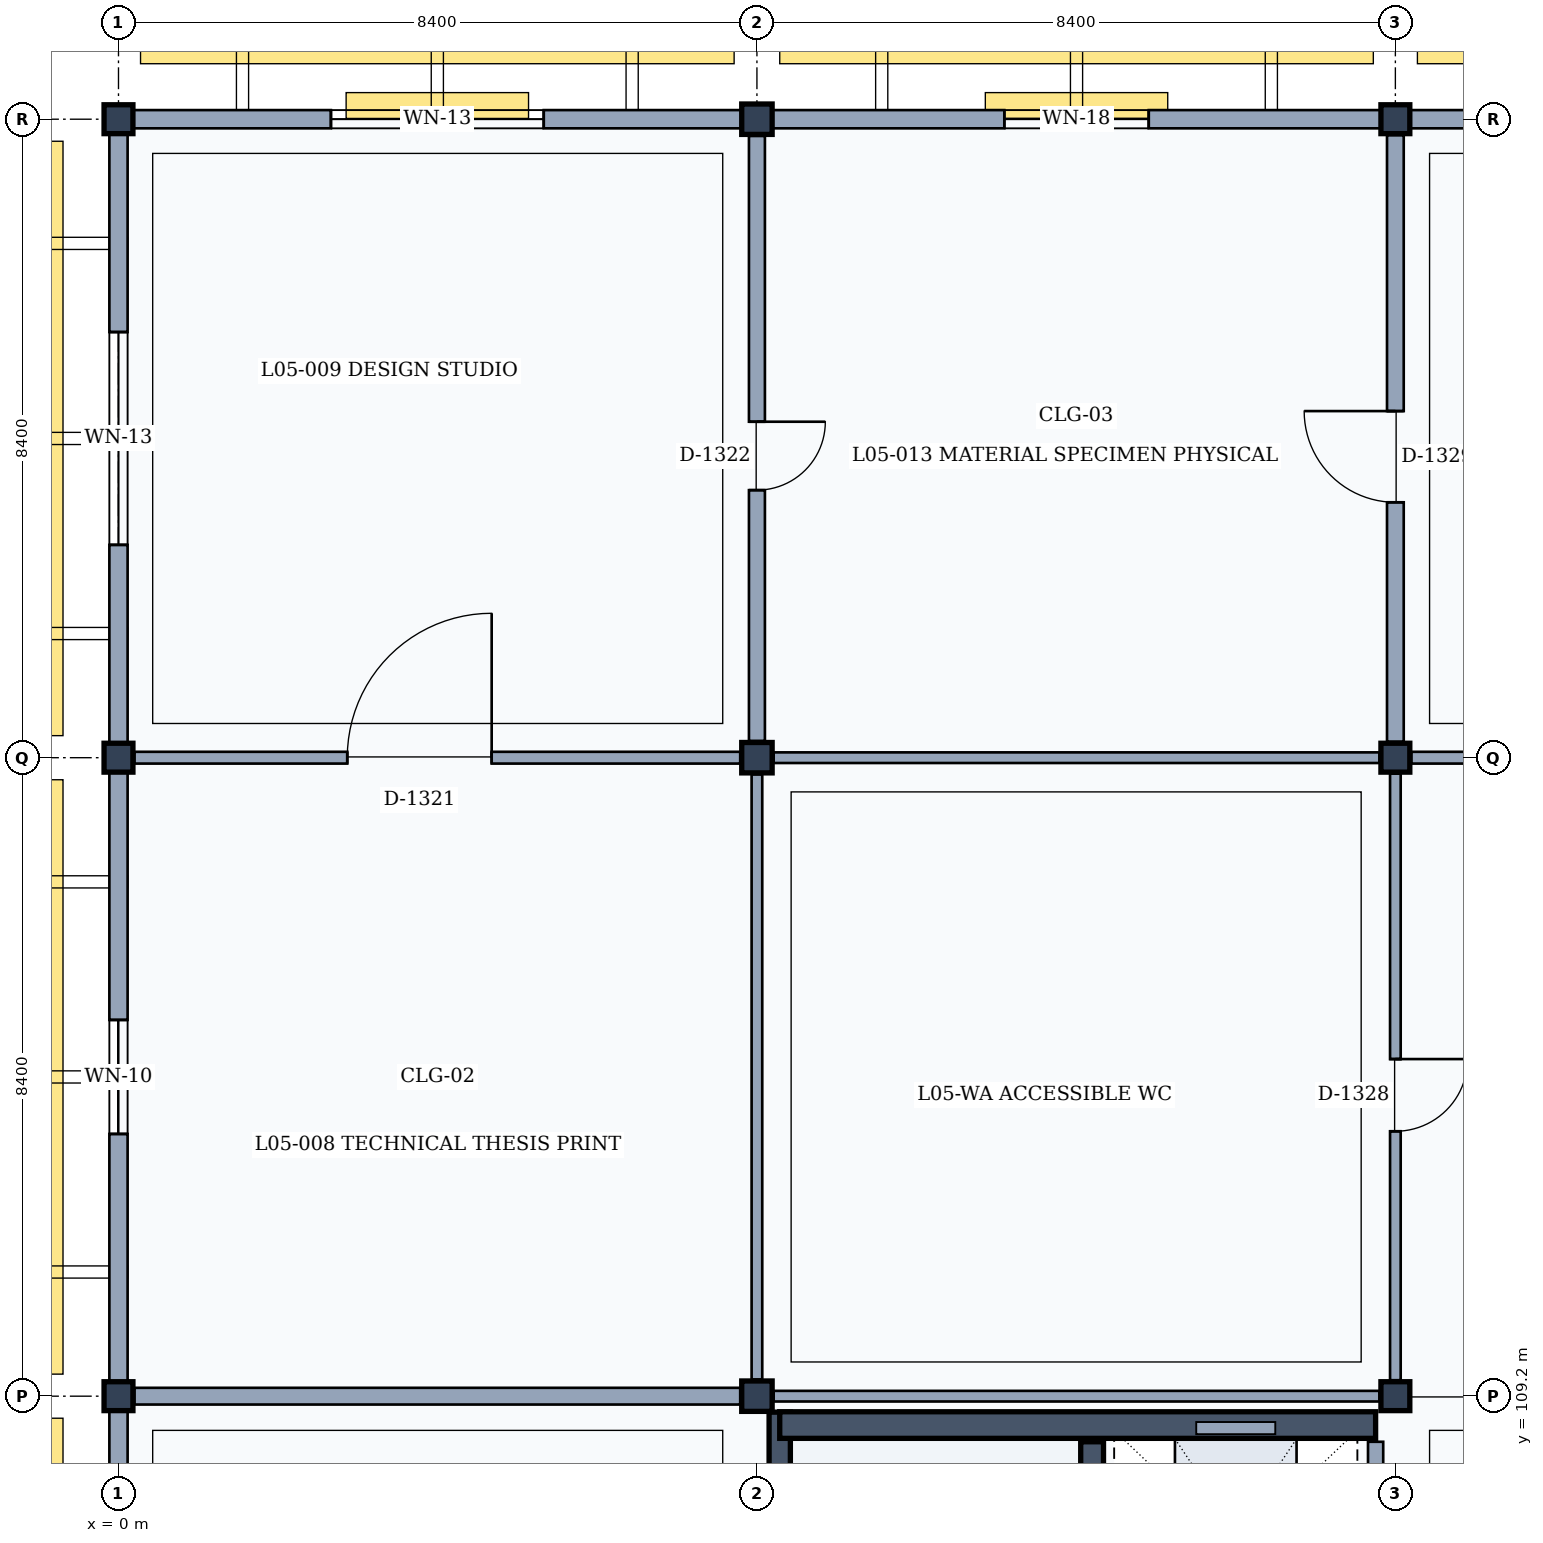
"""IFC4 building model, lengths in metres.
Left out: names, types, materials, properties, quantities, classifications, styles, units other than length and angle.
Written with IfcOpenShell. Run it as: python <this file> out.ifc"""

import sys

from ifc_helpers import new_model, si_unit, direction, frame, frame_2d, origin, origin_2d, place, context, subcontext, project, spatial, rectangle, extrude, element, fill, save


model = new_model("IFC4")
c1 = context("Model", 3, precision=1e-05, world=origin(), true_north=direction((0.0, 1.0)))
c2 = subcontext(c1, "Body", "Model", "MODEL_VIEW")
j1 = project(units=[si_unit("LENGTHUNIT", "METRE"), si_unit("PLANEANGLEUNIT", "RADIAN")], contexts=[c1])
p1 = place(None, origin())
s1 = spatial("IfcSite", under=j1, at=p1, CompositionType="ELEMENT")
p2 = place(p1, origin())
s2 = spatial("IfcBuilding", under=s1, at=p2, CompositionType="ELEMENT")
p3 = place(p2, frame((0.0, 0.0, 22.2)))
s3 = spatial("IfcBuildingStorey", under=s2, at=p3, CompositionType="ELEMENT", Elevation=22.2)
for number, where, z_axis, x_axis in (
    (1, (0.0, 109.2, 0.0), (0.0, 0.0, 1.0), (1.0, 0.0, 0.0)),
    (2, (0.0, 117.6, 0.0), (0.0, 0.0, 1.0), (1.0, 0.0, 0.0)),
    (3, (0.0, 126.0, 0.0), (0.0, 0.0, 1.0), (1.0, 0.0, 0.0)),
):
    element("IfcColumn", number, at=place(p3, frame(where, z_axis=z_axis, x_axis=x_axis)), inside=s3, PredefinedType="COLUMN", context=c2, shape_type="SweptSolid", body=[
        extrude(rectangle(XDim=0.38, YDim=0.38, at=origin_2d()), origin(), (0.0, 0.0, 1.0), 4.2),
    ])
for number, where, z_axis, x_axis in (
    (4, (8.4, 109.2, 0.0), (0.0, 0.0, 1.0), (1.0, 0.0, 0.0)),
    (5, (8.4, 117.6, 0.0), (0.0, 0.0, 1.0), (1.0, 0.0, 0.0)),
    (6, (8.4, 126.0, 0.0), (0.0, 0.0, 1.0), (1.0, 0.0, 0.0)),
):
    element("IfcColumn", number, at=place(p3, frame(where, z_axis=z_axis, x_axis=x_axis)), inside=s3, PredefinedType="COLUMN", context=c2, shape_type="SweptSolid", body=[
        extrude(rectangle(XDim=0.4, YDim=0.4, at=origin_2d()), origin(), (0.0, 0.0, 1.0), 4.2),
    ])
for number, where, z_axis, x_axis in (
    (7, (16.8, 109.2, 0.0), (0.0, 0.0, 1.0), (1.0, 0.0, 0.0)),
    (8, (16.8, 117.6, 0.0), (0.0, 0.0, 1.0), (1.0, 0.0, 0.0)),
    (9, (16.8, 126.0, 0.0), (0.0, 0.0, 1.0), (1.0, 0.0, 0.0)),
):
    element("IfcColumn", number, at=place(p3, frame(where, z_axis=z_axis, x_axis=x_axis)), inside=s3, PredefinedType="COLUMN", context=c2, shape_type="SweptSolid", body=[
        extrude(rectangle(XDim=0.38, YDim=0.38, at=origin_2d()), origin(), (0.0, 0.0, 1.0), 4.2),
    ])
p4 = place(p3, frame((0.0, 100.99, 0.0), z_axis=(0.0, 0.0, 1.0), x_axis=(0.0, 1.0, 0.0)))
e10 = element("IfcWall", 10, at=p4, inside=s3, PredefinedType="SOLIDWALL", context=c2, shape_type="SweptSolid", body=[
    extrude(rectangle(XDim=8.02, YDim=0.24, at=frame_2d((4.01, 0.0))), origin(), (0.0, 0.0, 1.0), 3.36),
])
p5 = place(p4, frame((2.96, 0.0, 0.9)))
e11 = element("IfcOpeningElement", 11, at=p5, cuts=e10, PredefinedType="OPENING", context=c2, shape_type="SweptSolid", body=[
    extrude(rectangle(XDim=2.1, YDim=1.6, at=frame_2d((1.05, 0.8))), frame((0.0, 0.13, 0.0), z_axis=(0.0, -1.0, 0.0), x_axis=(1.0, 0.0, 0.0)), (0.0, 0.0, 1.0), 0.26),
])
p6 = place(p3, frame((0.0, 109.39, 0.0), z_axis=(0.0, 0.0, 1.0), x_axis=(0.0, 1.0, 0.0)))
e12 = element("IfcWall", 12, at=p6, inside=s3, PredefinedType="SOLIDWALL", context=c2, shape_type="SweptSolid", body=[
    extrude(rectangle(XDim=8.02, YDim=0.24, at=frame_2d((4.01, 0.0))), origin(), (0.0, 0.0, 1.0), 3.36),
])
p7 = place(p6, frame((3.26, 0.0, 0.9)))
e13 = element("IfcOpeningElement", 13, at=p7, cuts=e12, PredefinedType="OPENING", context=c2, shape_type="SweptSolid", body=[
    extrude(rectangle(XDim=1.5, YDim=1.85, at=frame_2d((0.75, 0.925))), frame((0.0, 0.13, 0.0), z_axis=(0.0, -1.0, 0.0), x_axis=(1.0, 0.0, 0.0)), (0.0, 0.0, 1.0), 0.26),
])
p8 = place(p3, frame((0.19, 126.0, 0.0), z_axis=(0.0, 0.0, 1.0), x_axis=(1.0, 0.0, 0.0)))
e14 = element("IfcWall", 14, at=p8, inside=s3, PredefinedType="SOLIDWALL", context=c2, shape_type="SweptSolid", body=[
    extrude(rectangle(XDim=8.01, YDim=0.24, at=frame_2d((4.005, 0.0))), origin(), (0.0, 0.0, 1.0), 3.36),
])
p9 = place(p8, frame((2.605, 0.0, 0.9)))
e15 = element("IfcOpeningElement", 15, at=p9, cuts=e14, PredefinedType="OPENING", context=c2, shape_type="SweptSolid", body=[
    extrude(rectangle(XDim=2.8, YDim=1.65, at=frame_2d((1.4, 0.825))), frame((0.0, 0.13, 0.0), z_axis=(0.0, -1.0, 0.0), x_axis=(1.0, 0.0, 0.0)), (0.0, 0.0, 1.0), 0.26),
])
p10 = place(p3, frame((0.0, 117.79, 0.0), z_axis=(0.0, 0.0, 1.0), x_axis=(0.0, 1.0, 0.0)))
e16 = element("IfcWall", 16, at=p10, inside=s3, PredefinedType="SOLIDWALL", context=c2, shape_type="SweptSolid", body=[
    extrude(rectangle(XDim=8.02, YDim=0.24, at=frame_2d((4.01, 0.0))), origin(), (0.0, 0.0, 1.0), 3.36),
])
p11 = place(p10, frame((2.61, 0.0, 0.9)))
e17 = element("IfcOpeningElement", 17, at=p11, cuts=e16, PredefinedType="OPENING", context=c2, shape_type="SweptSolid", body=[
    extrude(rectangle(XDim=2.8, YDim=1.65, at=frame_2d((1.4, 0.825))), frame((0.0, 0.13, 0.0), z_axis=(0.0, -1.0, 0.0), x_axis=(1.0, 0.0, 0.0)), (0.0, 0.0, 1.0), 0.26),
])
p12 = place(p3, frame((8.6, 126.0, 0.0), z_axis=(0.0, 0.0, 1.0), x_axis=(1.0, 0.0, 0.0)))
e18 = element("IfcWall", 18, at=p12, inside=s3, PredefinedType="SOLIDWALL", context=c2, shape_type="SweptSolid", body=[
    extrude(rectangle(XDim=8.01, YDim=0.24, at=frame_2d((4.005, 0.0))), origin(), (0.0, 0.0, 1.0), 3.36),
])
p13 = place(p12, frame((3.055, 0.0, 0.9)))
e19 = element("IfcOpeningElement", 19, at=p13, cuts=e18, PredefinedType="OPENING", context=c2, shape_type="SweptSolid", body=[
    extrude(rectangle(XDim=1.9, YDim=2.05, at=frame_2d((0.95, 1.025))), frame((0.0, 0.13, 0.0), z_axis=(0.0, -1.0, 0.0), x_axis=(1.0, 0.0, 0.0)), (0.0, 0.0, 1.0), 0.26),
])
p14 = place(p3, frame((16.99, 126.0, 0.0), z_axis=(0.0, 0.0, 1.0), x_axis=(1.0, 0.0, 0.0)))
e20 = element("IfcWall", 20, at=p14, inside=s3, PredefinedType="SOLIDWALL", context=c2, shape_type="SweptSolid", body=[
    extrude(rectangle(XDim=8.01, YDim=0.24, at=frame_2d((4.005, 0.0))), origin(), (0.0, 0.0, 1.0), 3.36),
])
p15 = place(p14, frame((3.18, 0.0, 0.9)))
e21 = element("IfcOpeningElement", 21, at=p15, cuts=e20, PredefinedType="OPENING", context=c2, shape_type="SweptSolid", body=[
    extrude(rectangle(XDim=1.65, YDim=1.9, at=frame_2d((0.825, 0.95))), frame((0.0, 0.13, 0.0), z_axis=(0.0, -1.0, 0.0), x_axis=(1.0, 0.0, 0.0)), (0.0, 0.0, 1.0), 0.26),
])
p16 = place(p3, frame((8.7, 101.05, 0.0), z_axis=(0.0, 0.0, 1.0), x_axis=(0.0, 1.0, 0.0)))
e22 = element("IfcWall", 22, at=p16, inside=s3, PredefinedType="SHEAR", context=c2, shape_type="SweptSolid", body=[
    extrude(rectangle(XDim=7.94, YDim=0.28, at=frame_2d((3.97, 0.0))), origin(), (0.0, 0.0, 1.0), 3.98),
])
p17 = place(p3, frame((8.7, 108.82, 0.0), z_axis=(0.0, 0.0, 1.0), x_axis=(1.0, 0.0, 0.0)))
e23 = element("IfcWall", 23, at=p17, inside=s3, PredefinedType="SHEAR", context=c2, shape_type="SweptSolid", body=[
    extrude(rectangle(XDim=7.84, YDim=0.35, at=frame_2d((3.92, 0.0))), origin(), (0.0, 0.0, 1.0), 3.98),
])
p18 = place(p3, frame((16.54, 108.6, 0.0), z_axis=(0.0, 0.0, 1.0), x_axis=(0.0, -1.0, 0.0)))
e24 = element("IfcWall", 24, at=p18, inside=s3, PredefinedType="PARTITIONING", context=c2, shape_type="SweptSolid", body=[
    extrude(rectangle(XDim=7.2, YDim=0.2, at=frame_2d((3.6, 0.0))), origin(), (0.0, 0.0, 1.0), 3.32),
])
p19 = place(p18, frame((3.55, 0.0, 0.0)))
e25 = element("IfcOpeningElement", 25, at=p19, cuts=e24, PredefinedType="OPENING", context=c2, shape_type="SweptSolid", body=[
    extrude(rectangle(XDim=1.1, YDim=2.15, at=frame_2d((0.55, 1.075))), frame((0.0, 0.11, 0.0), z_axis=(0.0, -1.0, 0.0), x_axis=(1.0, 0.0, 0.0)), (0.0, 0.0, 1.0), 0.22),
])
p20 = place(p3, frame((12.81, 101.22, 0.0), z_axis=(0.0, 0.0, 1.0), x_axis=(0.0, 1.0, 0.0)))
e26 = element("IfcWall", 26, at=p20, inside=s3, PredefinedType="SHEAR", context=c2, shape_type="SweptSolid", body=[
    extrude(rectangle(XDim=7.38, YDim=0.3, at=frame_2d((3.69, 0.0))), origin(), (0.0, 0.0, 1.0), 3.98),
])
p21 = place(p20, frame((0.28, 0.0, 0.0)))
e27 = element("IfcOpeningElement", 27, at=p21, cuts=e26, PredefinedType="OPENING", context=c2, shape_type="SweptSolid", body=[
    extrude(rectangle(XDim=1.1, YDim=2.15, at=frame_2d((0.55, 1.075))), frame((0.0, 0.16, 0.0), z_axis=(0.0, -1.0, 0.0), x_axis=(1.0, 0.0, 0.0)), (0.0, 0.0, 1.0), 0.32),
])
p22 = place(p3, frame((0.21, 109.2, 0.0), z_axis=(0.0, 0.0, 1.0), x_axis=(1.0, 0.0, 0.0)))
e28 = element("IfcWall", 28, at=p22, inside=s3, PredefinedType="PARTITIONING", context=c2, shape_type="SweptSolid", body=[
    extrude(rectangle(XDim=7.97, YDim=0.22, at=frame_2d((3.985, 0.0))), origin(), (0.0, 0.0, 1.0), 3.32),
])
p23 = place(p3, frame((8.4, 109.42, 0.0), z_axis=(0.0, 0.0, 1.0), x_axis=(0.0, 1.0, 0.0)))
e29 = element("IfcWall", 29, at=p23, inside=s3, PredefinedType="PARTITIONING", context=c2, shape_type="SweptSolid", body=[
    extrude(rectangle(XDim=7.96, YDim=0.14, at=frame_2d((3.98, 0.0))), origin(), (0.0, 0.0, 1.0), 3.32),
])
p24 = place(p3, frame((0.21, 117.6, 0.0), z_axis=(0.0, 0.0, 1.0), x_axis=(1.0, 0.0, 0.0)))
e30 = element("IfcWall", 30, at=p24, inside=s3, PredefinedType="PARTITIONING", context=c2, shape_type="SweptSolid", body=[
    extrude(rectangle(XDim=7.97, YDim=0.155, at=frame_2d((3.985, 0.0))), origin(), (0.0, 0.0, 1.0), 3.32),
])
p25 = place(p24, frame((2.8, 0.0, 0.0)))
e31 = element("IfcOpeningElement", 31, at=p25, cuts=e30, PredefinedType="OPENING", context=c2, shape_type="SweptSolid", body=[
    extrude(rectangle(XDim=1.9, YDim=2.4, at=frame_2d((0.95, 1.2))), frame((0.0, 0.087, 0.0), z_axis=(0.0, -1.0, 0.0), x_axis=(1.0, 0.0, 0.0)), (0.0, 0.0, 1.0), 0.175),
])
p26 = place(p3, frame((8.4, 117.82, 0.0), z_axis=(0.0, 0.0, 1.0), x_axis=(0.0, 1.0, 0.0)))
e32 = element("IfcWall", 32, at=p26, inside=s3, PredefinedType="PARTITIONING", context=c2, shape_type="SweptSolid", body=[
    extrude(rectangle(XDim=7.96, YDim=0.21, at=frame_2d((3.98, 0.0))), origin(), (0.0, 0.0, 1.0), 3.32),
])
p27 = place(p26, frame((3.3, 0.0, 0.0)))
e33 = element("IfcOpeningElement", 33, at=p27, cuts=e32, PredefinedType="OPENING", context=c2, shape_type="SweptSolid", body=[
    extrude(rectangle(XDim=0.9, YDim=2.1, at=frame_2d((0.45, 1.05))), frame((0.0, 0.115, 0.0), z_axis=(0.0, -1.0, 0.0), x_axis=(1.0, 0.0, 0.0)), (0.0, 0.0, 1.0), 0.23),
])
p28 = place(p3, frame((8.62, 109.2, 0.0), z_axis=(0.0, 0.0, 1.0), x_axis=(1.0, 0.0, 0.0)))
e34 = element("IfcWall", 34, at=p28, inside=s3, PredefinedType="PARTITIONING", context=c2, shape_type="SweptSolid", body=[
    extrude(rectangle(XDim=7.97, YDim=0.14, at=frame_2d((3.985, 0.0))), origin(), (0.0, 0.0, 1.0), 3.32),
])
p29 = place(p3, frame((16.8, 109.41, 0.0), z_axis=(0.0, 0.0, 1.0), x_axis=(0.0, 1.0, 0.0)))
e35 = element("IfcWall", 35, at=p29, inside=s3, PredefinedType="PARTITIONING", context=c2, shape_type="SweptSolid", body=[
    extrude(rectangle(XDim=7.98, YDim=0.14, at=frame_2d((3.99, 0.0))), origin(), (0.0, 0.0, 1.0), 3.32),
])
p30 = place(p29, frame((3.275, 0.0, 0.0)))
e36 = element("IfcOpeningElement", 36, at=p30, cuts=e35, PredefinedType="OPENING", context=c2, shape_type="SweptSolid", body=[
    extrude(rectangle(XDim=0.95, YDim=2.15, at=frame_2d((0.475, 1.075))), frame((0.0, 0.08, 0.0), z_axis=(0.0, -1.0, 0.0), x_axis=(1.0, 0.0, 0.0)), (0.0, 0.0, 1.0), 0.16),
])
p31 = place(p3, frame((8.62, 117.6, 0.0), z_axis=(0.0, 0.0, 1.0), x_axis=(1.0, 0.0, 0.0)))
e37 = element("IfcWall", 37, at=p31, inside=s3, PredefinedType="PARTITIONING", context=c2, shape_type="SweptSolid", body=[
    extrude(rectangle(XDim=7.97, YDim=0.14, at=frame_2d((3.985, 0.0))), origin(), (0.0, 0.0, 1.0), 3.32),
])
p32 = place(p3, frame((16.8, 117.81, 0.0), z_axis=(0.0, 0.0, 1.0), x_axis=(0.0, 1.0, 0.0)))
e38 = element("IfcWall", 38, at=p32, inside=s3, PredefinedType="PARTITIONING", context=c2, shape_type="SweptSolid", body=[
    extrude(rectangle(XDim=7.98, YDim=0.22, at=frame_2d((3.99, 0.0))), origin(), (0.0, 0.0, 1.0), 3.32),
])
p33 = place(p32, frame((3.15, 0.0, 0.0)))
e39 = element("IfcOpeningElement", 39, at=p33, cuts=e38, PredefinedType="OPENING", context=c2, shape_type="SweptSolid", body=[
    extrude(rectangle(XDim=1.2, YDim=2.2, at=frame_2d((0.6, 1.1))), frame((0.0, 0.12, 0.0), z_axis=(0.0, -1.0, 0.0), x_axis=(1.0, 0.0, 0.0)), (0.0, 0.0, 1.0), 0.24),
])
p34 = place(p3, frame((17.01, 117.6, 0.0), z_axis=(0.0, 0.0, 1.0), x_axis=(1.0, 0.0, 0.0)))
e40 = element("IfcWall", 40, at=p34, inside=s3, PredefinedType="PARTITIONING", context=c2, shape_type="SweptSolid", body=[
    extrude(rectangle(XDim=7.97, YDim=0.155, at=frame_2d((3.985, 0.0))), origin(), (0.0, 0.0, 1.0), 3.32),
])
p35 = place(p34, frame((3.0, 0.0, 0.0)))
e41 = element("IfcOpeningElement", 41, at=p35, cuts=e40, PredefinedType="OPENING", context=c2, shape_type="SweptSolid", body=[
    extrude(rectangle(XDim=1.5, YDim=2.3, at=frame_2d((0.75, 1.15))), frame((0.0, 0.087, 0.0), z_axis=(0.0, -1.0, 0.0), x_axis=(1.0, 0.0, 0.0)), (0.0, 0.0, 1.0), 0.175),
])
p36 = place(p7, origin())
e42 = element("IfcWindow", 42, at=p36, inside=s3, PartitioningType="SINGLE_PANEL", PredefinedType="WINDOW", context=c2, shape_type="SweptSolid", body=[
    extrude(rectangle(XDim=1.5, YDim=1.85, at=frame_2d((0.75, 0.925))), frame((0.0, 0.03, 0.0), z_axis=(0.0, -1.0, 0.0), x_axis=(1.0, 0.0, 0.0)), (0.0, 0.0, 1.0), 0.06),
])
fill(e13, e42)
p37 = place(p9, origin())
e43 = element("IfcWindow", 43, at=p37, inside=s3, PartitioningType="SINGLE_PANEL", PredefinedType="WINDOW", context=c2, shape_type="SweptSolid", body=[
    extrude(rectangle(XDim=2.8, YDim=1.65, at=frame_2d((1.4, 0.825))), frame((0.0, 0.03, 0.0), z_axis=(0.0, -1.0, 0.0), x_axis=(1.0, 0.0, 0.0)), (0.0, 0.0, 1.0), 0.06),
])
fill(e15, e43)
p38 = place(p11, origin())
e44 = element("IfcWindow", 44, at=p38, inside=s3, PartitioningType="SINGLE_PANEL", PredefinedType="WINDOW", context=c2, shape_type="SweptSolid", body=[
    extrude(rectangle(XDim=2.8, YDim=1.65, at=frame_2d((1.4, 0.825))), frame((0.0, 0.03, 0.0), z_axis=(0.0, -1.0, 0.0), x_axis=(1.0, 0.0, 0.0)), (0.0, 0.0, 1.0), 0.06),
])
fill(e17, e44)
p39 = place(p13, origin())
e45 = element("IfcWindow", 45, at=p39, inside=s3, PartitioningType="SINGLE_PANEL", PredefinedType="WINDOW", context=c2, shape_type="SweptSolid", body=[
    extrude(rectangle(XDim=1.9, YDim=2.05, at=frame_2d((0.95, 1.025))), frame((0.0, 0.03, 0.0), z_axis=(0.0, -1.0, 0.0), x_axis=(1.0, 0.0, 0.0)), (0.0, 0.0, 1.0), 0.06),
])
fill(e19, e45)
p40 = place(p25, origin())
e46 = element("IfcDoor", 46, at=p40, inside=s3, OperationType="SINGLE_SWING_RIGHT", PredefinedType="DOOR", context=c2, shape_type="SweptSolid", body=[
    extrude(rectangle(XDim=1.9, YDim=2.4, at=frame_2d((0.95, 1.2))), frame((0.0, 0.025, 0.0), z_axis=(0.0, -1.0, 0.0), x_axis=(1.0, 0.0, 0.0)), (0.0, 0.0, 1.0), 0.05),
])
fill(e31, e46)
p41 = place(p27, frame((0.9, 0.0, 0.0), z_axis=(0.0, 0.0, 1.0), x_axis=(-1.0, 0.0, 0.0)))
e47 = element("IfcDoor", 47, at=p41, inside=s3, OperationType="SINGLE_SWING_LEFT", PredefinedType="DOOR", context=c2, shape_type="SweptSolid", body=[
    extrude(rectangle(XDim=0.9, YDim=2.1, at=frame_2d((0.45, 1.05))), frame((0.0, 0.025, 0.0), z_axis=(0.0, -1.0, 0.0), x_axis=(1.0, 0.0, 0.0)), (0.0, 0.0, 1.0), 0.05),
])
fill(e33, e47)
p42 = place(p30, frame((0.95, 0.0, 0.0), z_axis=(0.0, 0.0, 1.0), x_axis=(-1.0, 0.0, 0.0)))
e48 = element("IfcDoor", 48, at=p42, inside=s3, OperationType="SINGLE_SWING_LEFT", PredefinedType="DOOR", context=c2, shape_type="SweptSolid", body=[
    extrude(rectangle(XDim=0.95, YDim=2.15, at=frame_2d((0.475, 1.075))), frame((0.0, 0.025, 0.0), z_axis=(0.0, -1.0, 0.0), x_axis=(1.0, 0.0, 0.0)), (0.0, 0.0, 1.0), 0.05),
])
fill(e36, e48)
p43 = place(p33, origin())
e49 = element("IfcDoor", 49, at=p43, inside=s3, OperationType="SINGLE_SWING_RIGHT", PredefinedType="DOOR", context=c2, shape_type="SweptSolid", body=[
    extrude(rectangle(XDim=1.2, YDim=2.2, at=frame_2d((0.6, 1.1))), frame((0.0, 0.025, 0.0), z_axis=(0.0, -1.0, 0.0), x_axis=(1.0, 0.0, 0.0)), (0.0, 0.0, 1.0), 0.05),
])
fill(e39, e49)
save(model, sys.argv[1])
